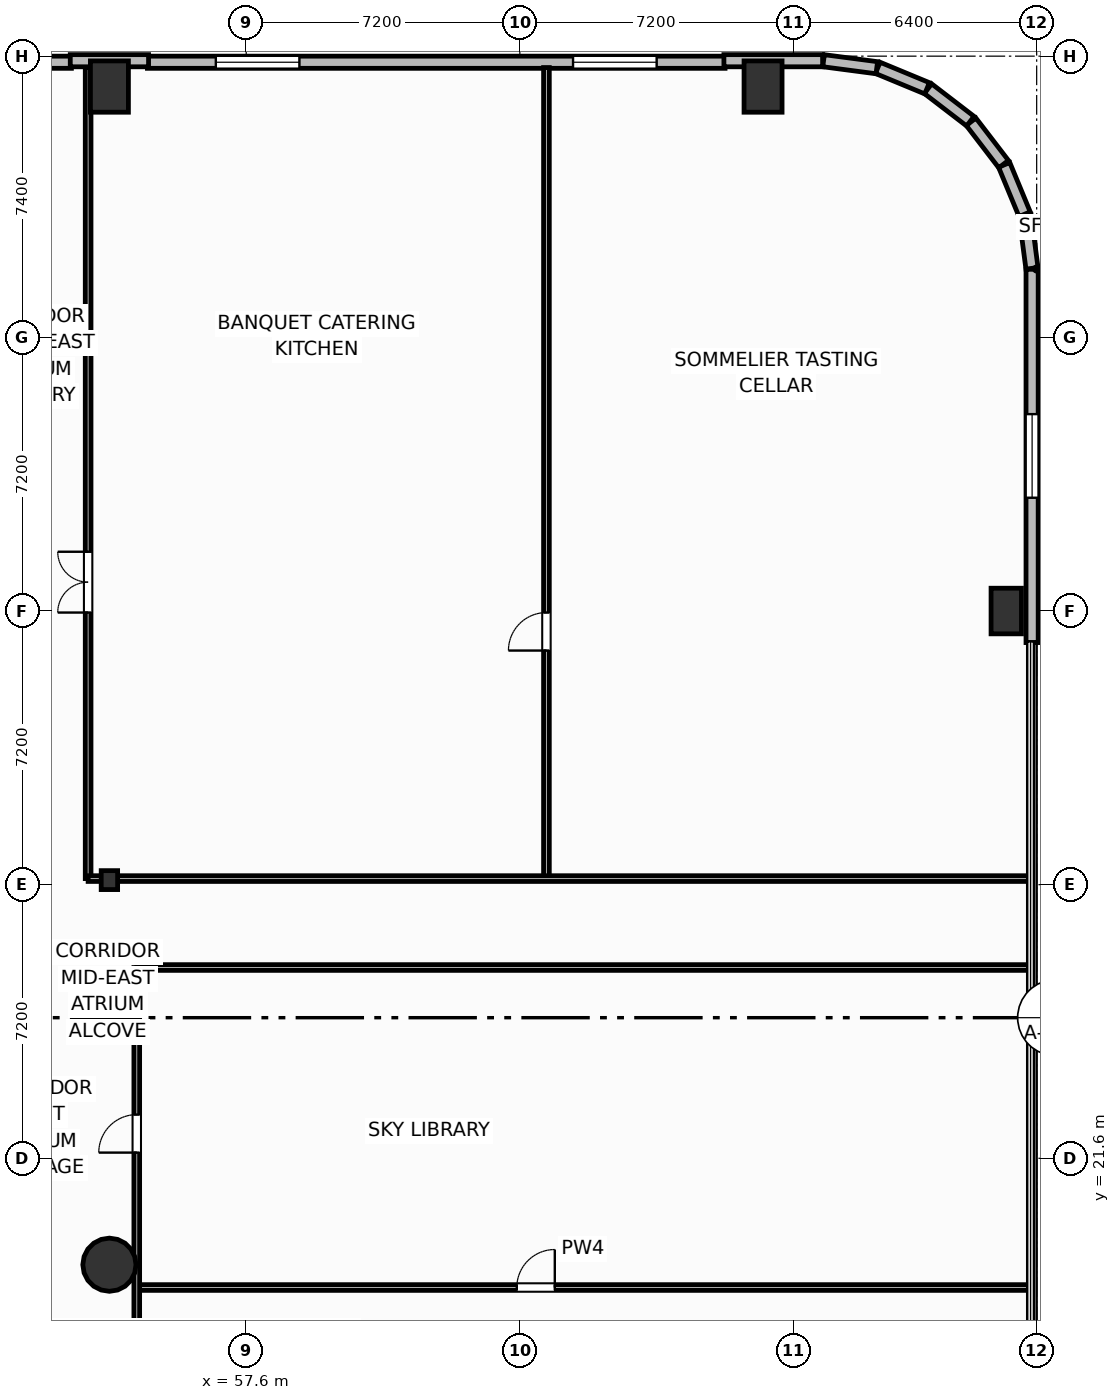
"""IFC4 building model, lengths in metres.
Left out: names, types, materials, properties, quantities, classifications, styles, units other than length and angle.
Written with IfcOpenShell. Run it as: python <this file> out.ifc"""

import sys

from ifc_helpers import new_model, si_unit, direction, frame, frame_2d, origin, origin_2d, place, context, subcontext, project, spatial, rectangle, circle, i_section, extrude, element, fill, save


model = new_model("IFC4")
c1 = context("Model", 3, precision=1e-05, world=origin(), true_north=direction((0.0, 1.0)))
c2 = subcontext(c1, "Body", "Model", "MODEL_VIEW")
j1 = project(units=[si_unit("LENGTHUNIT", "METRE"), si_unit("PLANEANGLEUNIT", "RADIAN")], contexts=[c1])
p1 = place(None, origin())
s1 = spatial("IfcSite", under=j1, at=p1, CompositionType="ELEMENT")
p2 = place(p1, origin())
s2 = spatial("IfcBuilding", under=s1, at=p2, CompositionType="ELEMENT")
p3 = place(p2, frame((0.0, 0.0, 16.2)))
s3 = spatial("IfcBuildingStorey", under=s2, at=p3, CompositionType="ELEMENT", Elevation=16.2)
p4 = place(p3, frame((54.0, 28.92, 0.0), z_axis=(0.0, 0.0, 1.0), x_axis=(1.0, 0.0, 0.0)))
e1 = element("IfcColumn", 1, at=p4, inside=s3, PredefinedType="COLUMN", context=c2, shape_type="SweptSolid", body=[
    extrude(i_section(OverallWidth=0.432, OverallDepth=0.498, WebThickness=0.056, FlangeThickness=0.089, FilletRadius=0.025, at=origin_2d()), origin(), (0.0, 0.0, 1.0), 5.4),
])
p5 = place(p3, frame((54.0, 18.8, 0.0), z_axis=(0.0, 0.0, 1.0), x_axis=(1.0, 0.0, 0.0)))
e2 = element("IfcColumn", 2, at=p5, inside=s3, PredefinedType="COLUMN", context=c2, shape_type="SweptSolid", body=[
    extrude(circle(Radius=0.7, at=origin_2d()), origin(), (0.0, 0.0, 1.0), 5.4),
])
for number, where, z_axis, x_axis in (
    (3, (54.0, 49.8, 0.0), (0.0, 0.0, 1.0), (1.0, 0.0, 0.0)),
    (4, (71.2, 49.8, 0.0), (0.0, 0.0, 1.0), (1.0, 0.0, 0.0)),
):
    element("IfcColumn", number, at=place(p3, frame(where, z_axis=z_axis, x_axis=x_axis)), inside=s3, PredefinedType="COLUMN", context=c2, shape_type="SweptSolid", body=[
        extrude(rectangle(XDim=1.0, YDim=1.35, at=origin_2d()), origin(), (0.0, 0.0, 1.0), 5.4),
    ])
p6 = place(p3, frame((77.6, 36.0, 0.0), z_axis=(0.0, 0.0, 1.0), x_axis=(1.0, 0.0, 0.0)))
e5 = element("IfcColumn", 5, at=p6, inside=s3, PredefinedType="PILASTER", context=c2, shape_type="SweptSolid", body=[
    extrude(rectangle(XDim=0.8, YDim=1.2, at=origin_2d()), origin(), (0.0, 0.0, 1.0), 5.4),
])
p7 = place(p3, frame((25.4, 50.44, 0.0), z_axis=(0.0, 0.0, 1.0), x_axis=(1.0, 0.0, 0.0)))
e6 = element("IfcWall", 6, at=p7, inside=s3, PredefinedType="SOLIDWALL", context=c2, shape_type="SweptSolid", body=[
    extrude(rectangle(XDim=27.6, YDim=0.32, at=frame_2d((13.8, 0.0))), origin(), (0.0, 0.0, 1.0), 4.03),
])
p8 = place(p7, frame((1.8, 0.0, 0.8)))
e7 = element("IfcOpeningElement", 7, at=p8, cuts=e6, PredefinedType="OPENING", context=c2, shape_type="SweptSolid", body=[
    extrude(rectangle(XDim=2.2, YDim=1.85, at=frame_2d((1.1, 0.925))), frame((0.0, 0.17, 0.0), z_axis=(0.0, -1.0, 0.0), x_axis=(1.0, 0.0, 0.0)), (0.0, 0.0, 1.0), 0.34),
])
p9 = place(p7, frame((23.6, 0.0, 0.8)))
e8 = element("IfcOpeningElement", 8, at=p9, cuts=e6, PredefinedType="OPENING", context=c2, shape_type="SweptSolid", body=[
    extrude(rectangle(XDim=2.2, YDim=1.85, at=frame_2d((1.1, 0.925))), frame((0.0, 0.17, 0.0), z_axis=(0.0, -1.0, 0.0), x_axis=(1.0, 0.0, 0.0)), (0.0, 0.0, 1.0), 0.34),
])
p10 = place(p3, frame((55.0, 50.44, 0.0), z_axis=(0.0, 0.0, 1.0), x_axis=(1.0, 0.0, 0.0)))
e9 = element("IfcWall", 9, at=p10, inside=s3, PredefinedType="SOLIDWALL", context=c2, shape_type="SweptSolid", body=[
    extrude(rectangle(XDim=15.2, YDim=0.32, at=frame_2d((7.6, 0.0))), origin(), (0.0, 0.0, 1.0), 4.03),
])
p11 = place(p10, frame((1.8, 0.0, 0.8)))
e10 = element("IfcOpeningElement", 10, at=p11, cuts=e9, PredefinedType="OPENING", context=c2, shape_type="SweptSolid", body=[
    extrude(rectangle(XDim=2.2, YDim=1.85, at=frame_2d((1.1, 0.925))), frame((0.0, 0.17, 0.0), z_axis=(0.0, -1.0, 0.0), x_axis=(1.0, 0.0, 0.0)), (0.0, 0.0, 1.0), 0.34),
])
p12 = place(p10, frame((11.2, 0.0, 0.8)))
e11 = element("IfcOpeningElement", 11, at=p12, cuts=e9, PredefinedType="OPENING", context=c2, shape_type="SweptSolid", body=[
    extrude(rectangle(XDim=2.2, YDim=1.85, at=frame_2d((1.1, 0.925))), frame((0.0, 0.17, 0.0), z_axis=(0.0, -1.0, 0.0), x_axis=(1.0, 0.0, 0.0)), (0.0, 0.0, 1.0), 0.34),
])
p13 = place(p3, frame((78.28, 35.17, 0.0), z_axis=(0.0, 0.0, 1.0), x_axis=(0.0, 1.0, 0.0)))
e12 = element("IfcWall", 12, at=p13, inside=s3, PredefinedType="SOLIDWALL", context=c2, shape_type="SweptSolid", body=[
    extrude(rectangle(XDim=9.822, YDim=0.32, at=frame_2d((4.911, 0.0))), origin(), (0.0, 0.0, 1.0), 4.03),
])
p14 = place(p13, frame((3.811, 0.0, 0.8)))
e13 = element("IfcOpeningElement", 13, at=p14, cuts=e12, PredefinedType="OPENING", context=c2, shape_type="SweptSolid", body=[
    extrude(rectangle(XDim=2.2, YDim=2.0, at=frame_2d((1.1, 1.0))), frame((0.0, 0.17, 0.0), z_axis=(0.0, -1.0, 0.0), x_axis=(1.0, 0.0, 0.0)), (0.0, 0.0, 1.0), 0.34),
])
p15 = place(p3, frame((78.277, 45.017, 0.0), z_axis=(0.0, 0.0, 1.0), x_axis=(-0.130409831203, 0.991460173646, 0.0)))
e14 = element("IfcWall", 14, at=p15, inside=s3, PredefinedType="SOLIDWALL", context=c2, shape_type="SweptSolid", body=[
    extrude(rectangle(XDim=1.413, YDim=0.32, at=frame_2d((0.707, 0.0))), origin(), (0.0, 0.0, 1.0), 4.03),
])
for number, where, z_axis, x_axis in (
    (15, (78.083, 46.441, 0.0), (0.0, 0.0, 1.0), (-0.383, 0.924, 0.0)),
    (16, (77.53, 47.759, 0.0), (0.0, 0.0, 1.0), (-0.609, 0.793, 0.0)),
    (17, (76.654, 48.889, 0.0), (0.0, 0.0, 1.0), (-0.793, 0.609, 0.0)),
    (18, (75.516, 49.754, 0.0), (0.0, 0.0, 1.0), (-0.924, 0.383, 0.0)),
):
    element("IfcWall", number, at=place(p3, frame(where, z_axis=z_axis, x_axis=x_axis)), inside=s3, PredefinedType="SOLIDWALL", context=c2, shape_type="SweptSolid", body=[
        extrude(rectangle(XDim=1.405, YDim=0.32, at=frame_2d((0.703, 0.0))), origin(), (0.0, 0.0, 1.0), 4.03),
    ])
p16 = place(p3, frame((74.193, 50.296, 0.0), z_axis=(0.0, 0.0, 1.0), x_axis=(-0.991460173646, 0.130409831203, 0.0)))
e19 = element("IfcWall", 19, at=p16, inside=s3, PredefinedType="SOLIDWALL", context=c2, shape_type="SweptSolid", body=[
    extrude(rectangle(XDim=1.413, YDim=0.32, at=frame_2d((0.707, 0.0))), origin(), (0.0, 0.0, 1.0), 4.03),
])
p17 = place(p3, frame((72.767, 50.48, 0.0), z_axis=(0.0, 0.0, 1.0), x_axis=(-1.0, 0.0, 0.0)))
e20 = element("IfcWall", 20, at=p17, inside=s3, PredefinedType="SOLIDWALL", context=c2, shape_type="SweptSolid", body=[
    extrude(rectangle(XDim=2.597, YDim=0.32, at=frame_2d((1.299, 0.0))), origin(), (0.0, 0.0, 1.0), 4.03),
])
p18 = place(p3, frame((55.03, 50.48, 0.0), z_axis=(0.0, 0.0, 1.0), x_axis=(-1.0, 0.0, 0.0)))
e21 = element("IfcWall", 21, at=p18, inside=s3, PredefinedType="SOLIDWALL", context=c2, shape_type="SweptSolid", body=[
    extrude(rectangle(XDim=2.06, YDim=0.32, at=frame_2d((1.03, 0.0))), origin(), (0.0, 0.0, 1.0), 4.03),
])
p19 = place(p3, frame((54.72, 18.2, 0.0), z_axis=(0.0, 0.0, 1.0), x_axis=(1.0, 0.0, 0.0)))
e22 = element("IfcWall", 22, at=p19, inside=s3, PredefinedType="PARTITIONING", context=c2, shape_type="SweptSolid", body=[
    extrude(rectangle(XDim=23.48, YDim=0.15, at=frame_2d((11.74, 0.0))), origin(), (0.0, 0.0, 1.0), 4.045),
])
p20 = place(p19, frame((10.0, 0.0, 0.0)))
e23 = element("IfcOpeningElement", 23, at=p20, cuts=e22, PredefinedType="OPENING", context=c2, shape_type="SweptSolid", body=[
    extrude(rectangle(XDim=1.0, YDim=2.05, at=frame_2d((0.5, 1.025))), frame((0.0, 0.085, 0.0), z_axis=(0.0, -1.0, 0.0), x_axis=(1.0, 0.0, 0.0)), (0.0, 0.0, 1.0), 0.17),
])
p21 = place(p3, frame((65.5, 28.96, 0.0), z_axis=(0.0, 0.0, 1.0), x_axis=(0.0, 1.0, 0.0)))
e24 = element("IfcWall", 24, at=p21, inside=s3, PredefinedType="PARTITIONING", context=c2, shape_type="SweptSolid", body=[
    extrude(rectangle(XDim=21.34, YDim=0.15, at=frame_2d((10.67, 0.0))), origin(), (0.0, 0.0, 1.0), 5.08),
])
p22 = place(p21, frame((6.0, 0.0, 0.0)))
e25 = element("IfcOpeningElement", 25, at=p22, cuts=e24, PredefinedType="OPENING", context=c2, shape_type="SweptSolid", body=[
    extrude(rectangle(XDim=1.0, YDim=2.05, at=frame_2d((0.5, 1.025))), frame((0.0, 0.085, 0.0), z_axis=(0.0, -1.0, 0.0), x_axis=(1.0, 0.0, 0.0)), (0.0, 0.0, 1.0), 0.17),
])
p23 = place(p3, frame((54.72, 0.25, 0.0), z_axis=(0.0, 0.0, 1.0), x_axis=(0.0, 1.0, 0.0)))
e26 = element("IfcWall", 26, at=p23, inside=s3, PredefinedType="PARTITIONING", context=c2, shape_type="SweptSolid", body=[
    extrude(rectangle(XDim=26.37, YDim=0.15, at=frame_2d((13.185, 0.0))), origin(), (0.0, 0.0, 1.0), 5.08),
])
p24 = place(p23, frame((13.2, 0.0, 0.0)))
e27 = element("IfcOpeningElement", 27, at=p24, cuts=e26, PredefinedType="OPENING", context=c2, shape_type="SweptSolid", body=[
    extrude(rectangle(XDim=1.0, YDim=2.05, at=frame_2d((0.5, 1.025))), frame((0.0, 0.085, 0.0), z_axis=(0.0, -1.0, 0.0), x_axis=(1.0, 0.0, 0.0)), (0.0, 0.0, 1.0), 0.17),
])
p25 = place(p23, frame((21.5, 0.0, 0.0)))
e28 = element("IfcOpeningElement", 28, at=p25, cuts=e26, PredefinedType="OPENING", context=c2, shape_type="SweptSolid", body=[
    extrude(rectangle(XDim=1.0, YDim=2.05, at=frame_2d((0.5, 1.025))), frame((0.0, 0.085, 0.0), z_axis=(0.0, -1.0, 0.0), x_axis=(1.0, 0.0, 0.0)), (0.0, 0.0, 1.0), 0.17),
])
p26 = place(p3, frame((54.72, 26.62, 0.0), z_axis=(0.0, 0.0, 1.0), x_axis=(1.0, 0.0, 0.0)))
e29 = element("IfcWall", 29, at=p26, inside=s3, PredefinedType="PARTITIONING", context=c2, shape_type="SweptSolid", body=[
    extrude(rectangle(XDim=23.48, YDim=0.15, at=frame_2d((11.74, 0.0))), origin(), (0.0, 0.0, 1.0), 5.08),
])
p27 = place(p3, frame((53.44, 28.96, 0.0), z_axis=(0.0, 0.0, 1.0), x_axis=(0.0, 1.0, 0.0)))
e30 = element("IfcWall", 30, at=p27, inside=s3, PredefinedType="PARTITIONING", context=c2, shape_type="SweptSolid", body=[
    extrude(rectangle(XDim=21.34, YDim=0.15, at=frame_2d((10.67, 0.0))), origin(), (0.0, 0.0, 1.0), 5.08),
])
p28 = place(p27, frame((7.0, 0.0, 0.0)))
e31 = element("IfcOpeningElement", 31, at=p28, cuts=e30, PredefinedType="OPENING", context=c2, shape_type="SweptSolid", body=[
    extrude(rectangle(XDim=1.6, YDim=2.05, at=frame_2d((0.8, 1.025))), frame((0.0, 0.085, 0.0), z_axis=(0.0, -1.0, 0.0), x_axis=(1.0, 0.0, 0.0)), (0.0, 0.0, 1.0), 0.17),
])
p29 = place(p3, frame((53.44, 28.96, 0.0), z_axis=(0.0, 0.0, 1.0), x_axis=(1.0, 0.0, 0.0)))
e32 = element("IfcWall", 32, at=p29, inside=s3, PredefinedType="PARTITIONING", context=c2, shape_type="SweptSolid", body=[
    extrude(rectangle(XDim=24.76, YDim=0.15, at=frame_2d((12.38, 0.0))), origin(), (0.0, 0.0, 1.0), 4.292),
])
p30 = place(p11, origin())
e33 = element("IfcWindow", 33, at=p30, inside=s3, PartitioningType="SINGLE_PANEL", PredefinedType="WINDOW", context=c2, shape_type="SweptSolid", body=[
    extrude(rectangle(XDim=2.2, YDim=1.85, at=frame_2d((1.1, 0.925))), frame((0.0, 0.03, 0.0), z_axis=(0.0, -1.0, 0.0), x_axis=(1.0, 0.0, 0.0)), (0.0, 0.0, 1.0), 0.06),
])
fill(e10, e33)
p31 = place(p12, origin())
e34 = element("IfcWindow", 34, at=p31, inside=s3, PartitioningType="SINGLE_PANEL", PredefinedType="WINDOW", context=c2, shape_type="SweptSolid", body=[
    extrude(rectangle(XDim=2.2, YDim=1.85, at=frame_2d((1.1, 0.925))), frame((0.0, 0.03, 0.0), z_axis=(0.0, -1.0, 0.0), x_axis=(1.0, 0.0, 0.0)), (0.0, 0.0, 1.0), 0.06),
])
fill(e11, e34)
p32 = place(p14, origin())
e35 = element("IfcWindow", 35, at=p32, inside=s3, PartitioningType="SINGLE_PANEL", PredefinedType="WINDOW", context=c2, shape_type="SweptSolid", body=[
    extrude(rectangle(XDim=2.2, YDim=2.0, at=frame_2d((1.1, 1.0))), frame((0.0, 0.03, 0.0), z_axis=(0.0, -1.0, 0.0), x_axis=(1.0, 0.0, 0.0)), (0.0, 0.0, 1.0), 0.06),
])
fill(e13, e35)
p33 = place(p20, origin())
e36 = element("IfcDoor", 36, at=p33, inside=s3, OperationType="SINGLE_SWING_RIGHT", PredefinedType="DOOR", context=c2, shape_type="SweptSolid", body=[
    extrude(rectangle(XDim=1.0, YDim=2.05, at=frame_2d((0.5, 1.025))), frame((0.0, 0.025, 0.0), z_axis=(0.0, -1.0, 0.0), x_axis=(1.0, 0.0, 0.0)), (0.0, 0.0, 1.0), 0.05),
])
fill(e23, e36)
p34 = place(p22, origin())
e37 = element("IfcDoor", 37, at=p34, inside=s3, OperationType="SINGLE_SWING_LEFT", PredefinedType="DOOR", context=c2, shape_type="SweptSolid", body=[
    extrude(rectangle(XDim=1.0, YDim=2.05, at=frame_2d((0.5, 1.025))), frame((0.0, 0.025, 0.0), z_axis=(0.0, -1.0, 0.0), x_axis=(1.0, 0.0, 0.0)), (0.0, 0.0, 1.0), 0.05),
])
fill(e25, e37)
p35 = place(p25, origin())
e38 = element("IfcDoor", 38, at=p35, inside=s3, OperationType="SINGLE_SWING_LEFT", PredefinedType="DOOR", context=c2, shape_type="SweptSolid", body=[
    extrude(rectangle(XDim=1.0, YDim=2.05, at=frame_2d((0.5, 1.025))), frame((0.0, 0.025, 0.0), z_axis=(0.0, -1.0, 0.0), x_axis=(1.0, 0.0, 0.0)), (0.0, 0.0, 1.0), 0.05),
])
fill(e28, e38)
p36 = place(p28, origin())
e39 = element("IfcDoor", 39, at=p36, inside=s3, OperationType="DOUBLE_DOOR_SINGLE_SWING", PredefinedType="DOOR", context=c2, shape_type="SweptSolid", body=[
    extrude(rectangle(XDim=1.6, YDim=2.05, at=frame_2d((0.8, 1.025))), frame((0.0, 0.025, 0.0), z_axis=(0.0, -1.0, 0.0), x_axis=(1.0, 0.0, 0.0)), (0.0, 0.0, 1.0), 0.05),
])
fill(e31, e39)
save(model, sys.argv[1])
